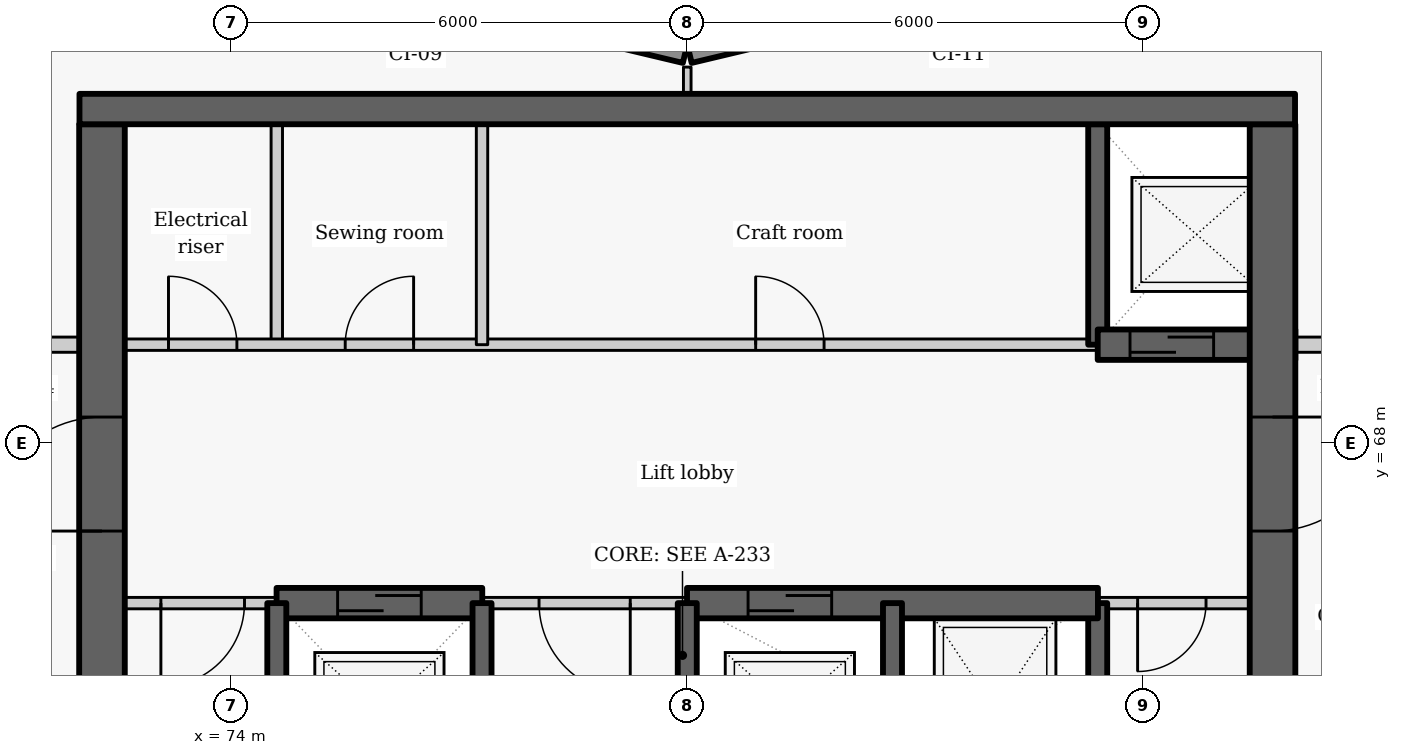
"""IFC4 building model, lengths in metres.
Left out: names, types, materials, properties, quantities, classifications, styles, units other than length and angle.
Written with IfcOpenShell. Run it as: python <this file> out.ifc"""

import sys

from ifc_helpers import new_model, si_unit, direction, frame, frame_2d, origin, place, context, subcontext, project, spatial, rectangle, extrude, element, fill, save


model = new_model("IFC4")
c1 = context("Model", 3, precision=1e-05, world=origin(), true_north=direction((0.0, 1.0)))
c2 = subcontext(c1, "Body", "Model", "MODEL_VIEW")
j1 = project(units=[si_unit("LENGTHUNIT", "METRE"), si_unit("PLANEANGLEUNIT", "RADIAN")], contexts=[c1])
p1 = place(None, origin())
s1 = spatial("IfcSite", under=j1, at=p1, CompositionType="ELEMENT")
p2 = place(p1, origin())
s2 = spatial("IfcBuilding", under=s1, at=p2, CompositionType="ELEMENT")
p3 = place(p2, frame((0.0, 0.0, 183.3)))
s3 = spatial("IfcBuildingStorey", under=s2, at=p3, CompositionType="ELEMENT", Elevation=183.3)
p4 = place(p3, frame((83.186, 73.881, 0.0), z_axis=(0.0, 0.0, 1.0), x_axis=(-0.972773113459, -0.231759508395, 0.0)))
e1 = element("IfcWall", 1, at=p4, inside=s3, PredefinedType="SOLIDWALL", context=c2, shape_type="SweptSolid", body=[
    extrude(rectangle(XDim=3.246, YDim=0.25, at=frame_2d((1.623, 0.0))), origin(), (0.0, 0.0, 1.0), 2.425),
])
p5 = place(p4, frame((0.573, 0.0, 0.9)))
e2 = element("IfcOpeningElement", 2, at=p5, cuts=e1, PredefinedType="OPENING", context=c2, shape_type="SweptSolid", body=[
    extrude(rectangle(XDim=2.1, YDim=1.1, at=frame_2d((1.05, 0.55))), frame((0.0, 0.135, 0.0), z_axis=(0.0, -1.0, 0.0), x_axis=(1.0, 0.0, 0.0)), (0.0, 0.0, 1.0), 0.27),
])
p6 = place(p3, frame((79.971, 73.128, 0.0), z_axis=(0.0, 0.0, 1.0), x_axis=(-0.972773113459, 0.231759508395, 0.0)))
e3 = element("IfcWall", 3, at=p6, inside=s3, PredefinedType="SOLIDWALL", context=c2, shape_type="SweptSolid", body=[
    extrude(rectangle(XDim=3.246, YDim=0.25, at=frame_2d((1.623, 0.0))), origin(), (0.0, 0.0, 1.0), 2.425),
])
p7 = place(p6, frame((0.573, 0.0, 0.9)))
e4 = element("IfcOpeningElement", 4, at=p7, cuts=e3, PredefinedType="OPENING", context=c2, shape_type="SweptSolid", body=[
    extrude(rectangle(XDim=2.1, YDim=1.1, at=frame_2d((1.05, 0.55))), frame((0.0, 0.135, 0.0), z_axis=(0.0, -1.0, 0.0), x_axis=(1.0, 0.0, 0.0)), (0.0, 0.0, 1.0), 0.27),
])
p8 = place(p3, frame((74.6, 69.3, 0.0), z_axis=(0.0, 0.0, 1.0), x_axis=(0.0, 1.0, 0.0)))
e5 = element("IfcWall", 5, at=p8, inside=s3, PredefinedType="PARTITIONING", context=c2, shape_type="SweptSolid", body=[
    extrude(rectangle(XDim=2.9, YDim=0.15, at=frame_2d((1.45, 0.0))), origin(), (0.0, 0.0, 1.0), 3.025),
])
p9 = place(p3, frame((72.0, 69.3, 0.0), z_axis=(0.0, 0.0, 1.0), x_axis=(1.0, 0.0, 0.0)))
e6 = element("IfcWall", 6, at=p9, inside=s3, PredefinedType="PARTITIONING", context=c2, shape_type="SweptSolid", body=[
    extrude(rectangle(XDim=13.4, YDim=0.15, at=frame_2d((6.7, 0.0))), origin(), (0.0, 0.0, 1.0), 3.025),
])
p10 = place(p9, frame((1.175, 0.0, 0.0)))
e7 = element("IfcOpeningElement", 7, at=p10, cuts=e6, PredefinedType="OPENING", context=c2, shape_type="SweptSolid", body=[
    extrude(rectangle(XDim=0.9, YDim=2.1, at=frame_2d((0.45, 1.05))), frame((0.0, 0.085, 0.0), z_axis=(0.0, -1.0, 0.0), x_axis=(1.0, 0.0, 0.0)), (0.0, 0.0, 1.0), 0.17),
])
p11 = place(p9, frame((3.5, 0.0, 0.0)))
e8 = element("IfcOpeningElement", 8, at=p11, cuts=e6, PredefinedType="OPENING", context=c2, shape_type="SweptSolid", body=[
    extrude(rectangle(XDim=0.9, YDim=2.1, at=frame_2d((0.45, 1.05))), frame((0.0, 0.085, 0.0), z_axis=(0.0, -1.0, 0.0), x_axis=(1.0, 0.0, 0.0)), (0.0, 0.0, 1.0), 0.17),
])
p12 = place(p9, frame((8.9, 0.0, 0.0)))
e9 = element("IfcOpeningElement", 9, at=p12, cuts=e6, PredefinedType="OPENING", context=c2, shape_type="SweptSolid", body=[
    extrude(rectangle(XDim=0.9, YDim=2.1, at=frame_2d((0.45, 1.05))), frame((0.0, 0.085, 0.0), z_axis=(0.0, -1.0, 0.0), x_axis=(1.0, 0.0, 0.0)), (0.0, 0.0, 1.0), 0.17),
])
p13 = place(p3, frame((72.3, 63.1, -0.275), z_axis=(0.0, 0.0, 1.0), x_axis=(0.0, 1.0, 0.0)))
e10 = element("IfcWall", 10, at=p13, inside=s3, PredefinedType="SHEAR", context=c2, shape_type="SweptSolid", body=[
    extrude(rectangle(XDim=9.1, YDim=0.6, at=frame_2d((4.55, 0.0))), origin(), (0.0, 0.0, 1.0), 3.3),
])
p14 = place(p13, frame((3.748, 0.0, 0.275)))
e11 = element("IfcOpeningElement", 11, at=p14, cuts=e10, PredefinedType="OPENING", context=c2, shape_type="SweptSolid", body=[
    extrude(rectangle(XDim=1.5, YDim=2.1, at=frame_2d((0.75, 1.05))), frame((0.0, 0.31, 0.0), z_axis=(0.0, -1.0, 0.0), x_axis=(1.0, 0.0, 0.0)), (0.0, 0.0, 1.0), 0.62),
])
p15 = place(p3, frame((85.4, 63.1, -0.275), z_axis=(0.0, 0.0, 1.0), x_axis=(0.0, 1.0, 0.0)))
e12 = element("IfcWall", 12, at=p15, inside=s3, PredefinedType="SHEAR", context=c2, shape_type="SweptSolid", body=[
    extrude(rectangle(XDim=2.8, YDim=0.25, at=frame_2d((1.4, 0.0))), origin(), (0.0, 0.0, 1.0), 3.3),
])
p16 = place(p3, frame((85.4, 69.3, -0.275), z_axis=(0.0, 0.0, 1.0), x_axis=(0.0, 1.0, 0.0)))
e13 = element("IfcWall", 13, at=p16, inside=s3, PredefinedType="SHEAR", context=c2, shape_type="SweptSolid", body=[
    extrude(rectangle(XDim=2.9, YDim=0.25, at=frame_2d((1.45, 0.0))), origin(), (0.0, 0.0, 1.0), 3.3),
])
p17 = place(p3, frame((85.4, 69.3, -0.275), z_axis=(0.0, 0.0, 1.0), x_axis=(1.0, 0.0, 0.0)))
e14 = element("IfcWall", 14, at=p17, inside=s3, PredefinedType="SHEAR", context=c2, shape_type="SweptSolid", body=[
    extrude(rectangle(XDim=2.6, YDim=0.4, at=frame_2d((1.3, 0.0))), origin(), (0.0, 0.0, 1.0), 3.3),
])
p18 = place(p17, frame((0.425, 0.0, 0.275)))
e15 = element("IfcOpeningElement", 15, at=p18, cuts=e14, PredefinedType="OPENING", context=c2, shape_type="SweptSolid", body=[
    extrude(rectangle(XDim=1.1, YDim=2.1, at=frame_2d((0.55, 1.05))), frame((0.0, 0.21, 0.0), z_axis=(0.0, -1.0, 0.0), x_axis=(1.0, 0.0, 0.0)), (0.0, 0.0, 1.0), 0.42),
])
p19 = place(p3, frame((87.7, 72.2, -0.275), z_axis=(0.0, 0.0, 1.0), x_axis=(0.0, -1.0, 0.0)))
e16 = element("IfcWall", 16, at=p19, inside=s3, PredefinedType="SHEAR", context=c2, shape_type="SweptSolid", body=[
    extrude(rectangle(XDim=14.25, YDim=0.6, at=frame_2d((7.125, 0.0))), origin(), (0.0, 0.0, 1.0), 3.3),
])
p20 = place(p19, frame((3.852, 0.0, 0.275)))
e17 = element("IfcOpeningElement", 17, at=p20, cuts=e16, PredefinedType="OPENING", context=c2, shape_type="SweptSolid", body=[
    extrude(rectangle(XDim=1.5, YDim=2.1, at=frame_2d((0.75, 1.05))), frame((0.0, 0.31, 0.0), z_axis=(0.0, -1.0, 0.0), x_axis=(1.0, 0.0, 0.0)), (0.0, 0.0, 1.0), 0.62),
])
p21 = place(p3, frame((77.3, 69.3, 0.0), z_axis=(0.0, 0.0, 1.0), x_axis=(0.0, 1.0, 0.0)))
e18 = element("IfcWall", 18, at=p21, inside=s3, PredefinedType="PARTITIONING", context=c2, shape_type="SweptSolid", body=[
    extrude(rectangle(XDim=2.9, YDim=0.15, at=frame_2d((1.45, 0.0))), origin(), (0.0, 0.0, 1.0), 3.025),
])
p22 = place(p3, frame((74.603, 65.9, 0.0), z_axis=(0.0, 0.0, 1.0), x_axis=(-1.0, 0.0, 0.0)))
e19 = element("IfcWall", 19, at=p22, inside=s3, PredefinedType="PARTITIONING", context=c2, shape_type="SweptSolid", body=[
    extrude(rectangle(XDim=2.603, YDim=0.15, at=frame_2d((1.302, 0.0))), origin(), (0.0, 0.0, 1.0), 3.025),
])
p23 = place(p22, frame((0.428, 0.0, 0.0)))
e20 = element("IfcOpeningElement", 20, at=p23, cuts=e19, PredefinedType="OPENING", context=c2, shape_type="SweptSolid", body=[
    extrude(rectangle(XDim=1.1, YDim=2.1, at=frame_2d((0.55, 1.05))), frame((0.0, 0.085, 0.0), z_axis=(0.0, -1.0, 0.0), x_axis=(1.0, 0.0, 0.0)), (0.0, 0.0, 1.0), 0.17),
])
p24 = place(p3, frame((80.003, 65.9, 0.0), z_axis=(0.0, 0.0, 1.0), x_axis=(-1.0, 0.0, 0.0)))
e21 = element("IfcWall", 21, at=p24, inside=s3, PredefinedType="PARTITIONING", context=c2, shape_type="SweptSolid", body=[
    extrude(rectangle(XDim=2.706, YDim=0.15, at=frame_2d((1.353, 0.0))), origin(), (0.0, 0.0, 1.0), 3.025),
])
p25 = place(p24, frame((0.753, 0.0, 0.0)))
e22 = element("IfcOpeningElement", 22, at=p25, cuts=e21, PredefinedType="OPENING", context=c2, shape_type="SweptSolid", body=[
    extrude(rectangle(XDim=1.2, YDim=2.1, at=frame_2d((0.6, 1.05))), frame((0.0, 0.085, 0.0), z_axis=(0.0, -1.0, 0.0), x_axis=(1.0, 0.0, 0.0)), (0.0, 0.0, 1.0), 0.17),
])
p26 = place(p3, frame((88.0, 65.9, 0.0), z_axis=(0.0, 0.0, 1.0), x_axis=(-1.0, 0.0, 0.0)))
e23 = element("IfcWall", 23, at=p26, inside=s3, PredefinedType="PARTITIONING", context=c2, shape_type="SweptSolid", body=[
    extrude(rectangle(XDim=2.603, YDim=0.15, at=frame_2d((1.302, 0.0))), origin(), (0.0, 0.0, 1.0), 3.025),
])
p27 = place(p26, frame((1.175, 0.0, 0.0)))
e24 = element("IfcOpeningElement", 24, at=p27, cuts=e23, PredefinedType="OPENING", context=c2, shape_type="SweptSolid", body=[
    extrude(rectangle(XDim=0.9, YDim=2.1, at=frame_2d((0.45, 1.05))), frame((0.0, 0.085, 0.0), z_axis=(0.0, -1.0, 0.0), x_axis=(1.0, 0.0, 0.0)), (0.0, 0.0, 1.0), 0.17),
])
p28 = place(p3, frame((74.597, 65.9, -0.275), z_axis=(0.0, 0.0, 1.0), x_axis=(1.0, 0.0, 0.0)))
e25 = element("IfcWall", 25, at=p28, inside=s3, PredefinedType="SHEAR", context=c2, shape_type="SweptSolid", body=[
    extrude(rectangle(XDim=2.706, YDim=0.4, at=frame_2d((1.353, 0.0))), origin(), (0.0, 0.0, 1.0), 3.3),
])
p29 = place(p28, frame((0.803, 0.0, 0.275)))
e26 = element("IfcOpeningElement", 26, at=p29, cuts=e25, PredefinedType="OPENING", context=c2, shape_type="SweptSolid", body=[
    extrude(rectangle(XDim=1.1, YDim=2.1, at=frame_2d((0.55, 1.05))), frame((0.0, 0.21, 0.0), z_axis=(0.0, -1.0, 0.0), x_axis=(1.0, 0.0, 0.0)), (0.0, 0.0, 1.0), 0.42),
])
p30 = place(p3, frame((79.997, 65.9, -0.275), z_axis=(0.0, 0.0, 1.0), x_axis=(1.0, 0.0, 0.0)))
e27 = element("IfcWall", 27, at=p30, inside=s3, PredefinedType="SHEAR", context=c2, shape_type="SweptSolid", body=[
    extrude(rectangle(XDim=5.406, YDim=0.4, at=frame_2d((2.703, 0.0))), origin(), (0.0, 0.0, 1.0), 3.3),
])
p31 = place(p30, frame((0.803, 0.0, 0.275)))
e28 = element("IfcOpeningElement", 28, at=p31, cuts=e27, PredefinedType="OPENING", context=c2, shape_type="SweptSolid", body=[
    extrude(rectangle(XDim=1.1, YDim=2.1, at=frame_2d((0.55, 1.05))), frame((0.0, 0.21, 0.0), z_axis=(0.0, -1.0, 0.0), x_axis=(1.0, 0.0, 0.0)), (0.0, 0.0, 1.0), 0.42),
])
for number, where, z_axis, x_axis in (
    (29, (74.6, 63.1, -0.275), (0.0, 0.0, 1.0), (0.0, 1.0, 0.0)),
    (30, (77.3, 63.1, -0.275), (0.0, 0.0, 1.0), (0.0, 1.0, 0.0)),
    (31, (80.0, 63.1, -0.275), (0.0, 0.0, 1.0), (0.0, 1.0, 0.0)),
    (32, (82.7, 63.1, -0.275), (0.0, 0.0, 1.0), (0.0, 1.0, 0.0)),
):
    element("IfcWall", number, at=place(p3, frame(where, z_axis=z_axis, x_axis=x_axis)), inside=s3, PredefinedType="SHEAR", context=c2, shape_type="SweptSolid", body=[
        extrude(rectangle(XDim=2.8, YDim=0.25, at=frame_2d((1.4, 0.0))), origin(), (0.0, 0.0, 1.0), 3.3),
    ])
for number, where, z_axis, x_axis in (
    (33, (70.45, 69.3, 0.0), (0.0, 0.0, 1.0), (1.0, 0.0, 0.0)),
    (34, (88.0, 69.3, 0.0), (0.0, 0.0, 1.0), (1.0, 0.0, 0.0)),
):
    element("IfcWall", number, at=place(p3, frame(where, z_axis=z_axis, x_axis=x_axis)), inside=s3, PredefinedType="PARTITIONING", context=c2, shape_type="SweptSolid", body=[
        extrude(rectangle(XDim=1.55, YDim=0.2, at=frame_2d((0.775, 0.0))), origin(), (0.0, 0.0, 1.0), 3.025),
    ])
p32 = place(p3, frame((80.0, 72.6, 0.0), z_axis=(0.0, 0.0, 1.0), x_axis=(0.0, 1.0, 0.0)))
e35 = element("IfcWall", 35, at=p32, inside=s3, PredefinedType="PARTITIONING", context=c2, shape_type="SweptSolid", body=[
    extrude(rectangle(XDim=0.352, YDim=0.1, at=frame_2d((0.176, 0.0))), origin(), (0.0, 0.0, 1.0), 3.025),
])
p33 = place(p3, frame((72.004, 72.4, -0.275), z_axis=(0.0, 0.0, 1.0), x_axis=(1.0, 0.0, 0.0)))
e36 = element("IfcWall", 36, at=p33, inside=s3, PredefinedType="SHEAR", context=c2, shape_type="SweptSolid", body=[
    extrude(rectangle(XDim=15.992, YDim=0.4, at=frame_2d((7.996, 0.0))), origin(), (0.0, 0.0, 1.0), 3.3),
])
p34 = place(p10, origin())
e37 = element("IfcDoor", 37, at=p34, inside=s3, OperationType="SINGLE_SWING_LEFT", PredefinedType="DOOR", context=c2, shape_type="SweptSolid", body=[
    extrude(rectangle(XDim=0.9, YDim=2.1, at=frame_2d((0.45, 1.05))), frame((0.0, 0.025, 0.0), z_axis=(0.0, -1.0, 0.0), x_axis=(1.0, 0.0, 0.0)), (0.0, 0.0, 1.0), 0.05),
])
fill(e7, e37)
p35 = place(p18, origin())
e38 = element("IfcDoor", 38, at=p35, inside=s3, OperationType="SLIDING_TO_LEFT", PredefinedType="DOOR", context=c2, shape_type="SweptSolid", body=[
    extrude(rectangle(XDim=1.1, YDim=2.1, at=frame_2d((0.55, 1.05))), frame((0.0, 0.025, 0.0), z_axis=(0.0, -1.0, 0.0), x_axis=(1.0, 0.0, 0.0)), (0.0, 0.0, 1.0), 0.05),
])
fill(e15, e38)
p36 = place(p11, origin())
e39 = element("IfcDoor", 39, at=p36, inside=s3, OperationType="SINGLE_SWING_RIGHT", PredefinedType="DOOR", context=c2, shape_type="SweptSolid", body=[
    extrude(rectangle(XDim=0.9, YDim=2.1, at=frame_2d((0.45, 1.05))), frame((0.0, 0.025, 0.0), z_axis=(0.0, -1.0, 0.0), x_axis=(1.0, 0.0, 0.0)), (0.0, 0.0, 1.0), 0.05),
])
fill(e8, e39)
p37 = place(p12, origin())
e40 = element("IfcDoor", 40, at=p37, inside=s3, OperationType="SINGLE_SWING_LEFT", PredefinedType="DOOR", context=c2, shape_type="SweptSolid", body=[
    extrude(rectangle(XDim=0.9, YDim=2.1, at=frame_2d((0.45, 1.05))), frame((0.0, 0.025, 0.0), z_axis=(0.0, -1.0, 0.0), x_axis=(1.0, 0.0, 0.0)), (0.0, 0.0, 1.0), 0.05),
])
fill(e9, e40)
p38 = place(p23, origin())
e41 = element("IfcDoor", 41, at=p38, inside=s3, OperationType="SINGLE_SWING_RIGHT", PredefinedType="DOOR", context=c2, shape_type="SweptSolid", body=[
    extrude(rectangle(XDim=1.1, YDim=2.1, at=frame_2d((0.55, 1.05))), frame((0.0, 0.025, 0.0), z_axis=(0.0, -1.0, 0.0), x_axis=(1.0, 0.0, 0.0)), (0.0, 0.0, 1.0), 0.05),
])
fill(e20, e41)
p39 = place(p29, origin())
e42 = element("IfcDoor", 42, at=p39, inside=s3, OperationType="SLIDING_TO_LEFT", PredefinedType="DOOR", context=c2, shape_type="SweptSolid", body=[
    extrude(rectangle(XDim=1.1, YDim=2.1, at=frame_2d((0.55, 1.05))), frame((0.0, 0.025, 0.0), z_axis=(0.0, -1.0, 0.0), x_axis=(1.0, 0.0, 0.0)), (0.0, 0.0, 1.0), 0.05),
])
fill(e26, e42)
p40 = place(p25, origin())
e43 = element("IfcDoor", 43, at=p40, inside=s3, OperationType="DOUBLE_DOOR_SINGLE_SWING", PredefinedType="DOOR", context=c2, shape_type="SweptSolid", body=[
    extrude(rectangle(XDim=1.2, YDim=2.1, at=frame_2d((0.6, 1.05))), frame((0.0, 0.025, 0.0), z_axis=(0.0, -1.0, 0.0), x_axis=(1.0, 0.0, 0.0)), (0.0, 0.0, 1.0), 0.05),
])
fill(e22, e43)
p41 = place(p31, origin())
e44 = element("IfcDoor", 44, at=p41, inside=s3, OperationType="SLIDING_TO_LEFT", PredefinedType="DOOR", context=c2, shape_type="SweptSolid", body=[
    extrude(rectangle(XDim=1.1, YDim=2.1, at=frame_2d((0.55, 1.05))), frame((0.0, 0.025, 0.0), z_axis=(0.0, -1.0, 0.0), x_axis=(1.0, 0.0, 0.0)), (0.0, 0.0, 1.0), 0.05),
])
fill(e28, e44)
p42 = place(p27, origin())
e45 = element("IfcDoor", 45, at=p42, inside=s3, OperationType="SINGLE_SWING_RIGHT", PredefinedType="DOOR", context=c2, shape_type="SweptSolid", body=[
    extrude(rectangle(XDim=0.9, YDim=2.1, at=frame_2d((0.45, 1.05))), frame((0.0, 0.025, 0.0), z_axis=(0.0, -1.0, 0.0), x_axis=(1.0, 0.0, 0.0)), (0.0, 0.0, 1.0), 0.05),
])
fill(e24, e45)
p43 = place(p20, origin())
e46 = element("IfcDoor", 46, at=p43, inside=s3, OperationType="DOUBLE_DOOR_SINGLE_SWING", PredefinedType="DOOR", context=c2, shape_type="SweptSolid", body=[
    extrude(rectangle(XDim=1.5, YDim=2.1, at=frame_2d((0.75, 1.05))), frame((0.0, 0.025, 0.0), z_axis=(0.0, -1.0, 0.0), x_axis=(1.0, 0.0, 0.0)), (0.0, 0.0, 1.0), 0.05),
])
fill(e17, e46)
p44 = place(p14, origin())
e47 = element("IfcDoor", 47, at=p44, inside=s3, OperationType="DOUBLE_DOOR_SINGLE_SWING", PredefinedType="DOOR", context=c2, shape_type="SweptSolid", body=[
    extrude(rectangle(XDim=1.5, YDim=2.1, at=frame_2d((0.75, 1.05))), frame((0.0, 0.025, 0.0), z_axis=(0.0, -1.0, 0.0), x_axis=(1.0, 0.0, 0.0)), (0.0, 0.0, 1.0), 0.05),
])
fill(e11, e47)
save(model, sys.argv[1])
